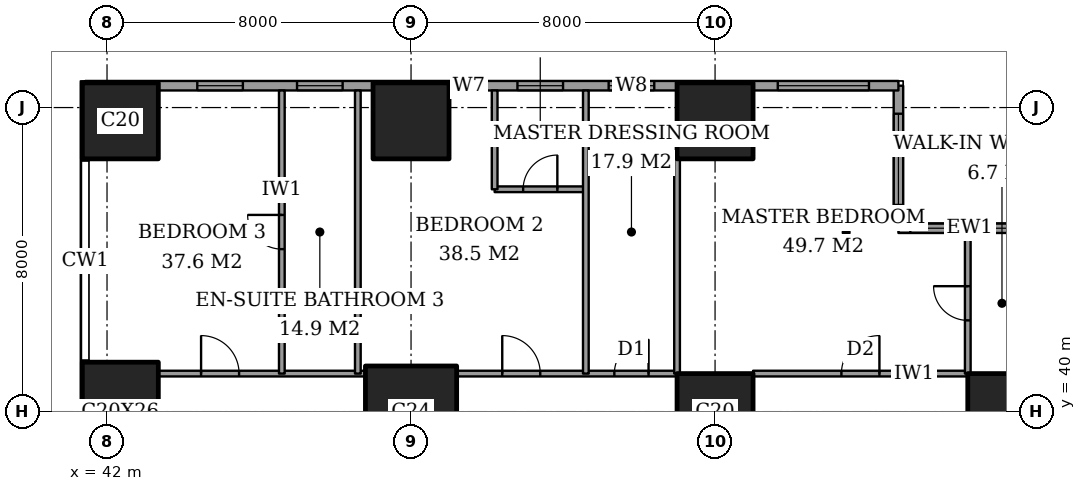
"""IFC4 building model, lengths in metres.
Left out: names, types, materials, properties, quantities, classifications, styles, units other than length and angle.
Written with IfcOpenShell. Run it as: python <this file> out.ifc"""

import sys

from ifc_helpers import new_model, si_unit, direction, frame, frame_2d, origin, origin_2d, place, context, subcontext, project, spatial, rectangle, extrude, element, fill, save


model = new_model("IFC4")
c1 = context("Model", 3, precision=1e-05, world=origin(), true_north=direction((0.0, 1.0)))
c2 = subcontext(c1, "Body", "Model", "MODEL_VIEW")
j1 = project(units=[si_unit("LENGTHUNIT", "METRE"), si_unit("PLANEANGLEUNIT", "RADIAN")], contexts=[c1])
p1 = place(None, origin())
s1 = spatial("IfcSite", under=j1, at=p1, CompositionType="ELEMENT")
p2 = place(p1, origin())
s2 = spatial("IfcBuilding", under=s1, at=p2, CompositionType="ELEMENT")
p3 = place(p2, frame((0.0, 0.0, 44.0)))
s3 = spatial("IfcBuildingStorey", under=s2, at=p3, CompositionType="ELEMENT", Elevation=44.0)
p4 = place(p3, frame((42.35, 40.0, 0.0), z_axis=(0.0, 0.0, 1.0), x_axis=(1.0, 0.0, 0.0)))
e1 = element("IfcColumn", 1, at=p4, inside=s3, PredefinedType="COLUMN", context=c2, shape_type="SweptSolid", body=[
    extrude(rectangle(XDim=2.0, YDim=2.6, at=origin_2d()), origin(), (0.0, 0.0, 1.0), 3.6),
])
p5 = place(p3, frame((42.35, 47.65, 0.0), z_axis=(0.0, 0.0, 1.0), x_axis=(1.0, 0.0, 0.0)))
e2 = element("IfcColumn", 2, at=p5, inside=s3, PredefinedType="COLUMN", context=c2, shape_type="SweptSolid", body=[
    extrude(rectangle(XDim=2.0, YDim=2.0, at=origin_2d()), origin(), (0.0, 0.0, 1.0), 3.6),
])
p6 = place(p3, frame((50.0, 40.0, 0.0), z_axis=(0.0, 0.0, 1.0), x_axis=(1.0, 0.0, 0.0)))
e3 = element("IfcColumn", 3, at=p6, inside=s3, PredefinedType="COLUMN", context=c2, shape_type="SweptSolid", body=[
    extrude(rectangle(XDim=2.4, YDim=2.4, at=origin_2d()), origin(), (0.0, 0.0, 1.0), 3.6),
])
for number, where, z_axis, x_axis in (
    (4, (50.0, 47.65, 0.0), (0.0, 0.0, 1.0), (1.0, 0.0, 0.0)),
    (5, (58.0, 40.0, 0.0), (0.0, 0.0, 1.0), (1.0, 0.0, 0.0)),
    (6, (58.0, 47.65, 0.0), (0.0, 0.0, 1.0), (1.0, 0.0, 0.0)),
    (7, (65.65, 40.0, 0.0), (0.0, 0.0, 1.0), (1.0, 0.0, 0.0)),
):
    element("IfcColumn", number, at=place(p3, frame(where, z_axis=z_axis, x_axis=x_axis)), inside=s3, PredefinedType="COLUMN", context=c2, shape_type="SweptSolid", body=[
        extrude(rectangle(XDim=2.0, YDim=2.0, at=origin_2d()), origin(), (0.0, 0.0, 1.0), 3.6),
    ])
p7 = place(p3, frame((66.575, 44.825, 0.0), z_axis=(0.0, 0.0, 1.0), x_axis=(-1.0, 0.0, 0.0)))
e8 = element("IfcWall", 8, at=p7, inside=s3, PredefinedType="SOLIDWALL", context=c2, shape_type="SweptSolid", body=[
    extrude(rectangle(XDim=3.75, YDim=0.25, at=frame_2d((1.875, 0.0))), origin(), (0.0, 0.0, 1.0), 3.6),
])
p8 = place(p7, frame((0.5, 0.0, 0.6)))
e9 = element("IfcOpeningElement", 9, at=p8, cuts=e8, PredefinedType="OPENING", context=c2, shape_type="SweptSolid", body=[
    extrude(rectangle(XDim=1.2, YDim=2.0, at=frame_2d((0.6, 1.0))), frame((0.0, 0.135, 0.0), z_axis=(0.0, -1.0, 0.0), x_axis=(1.0, 0.0, 0.0)), (0.0, 0.0, 1.0), 0.27),
])
p9 = place(p7, frame((2.238, 0.0, 0.6)))
e10 = element("IfcOpeningElement", 10, at=p9, cuts=e8, PredefinedType="OPENING", context=c2, shape_type="SweptSolid", body=[
    extrude(rectangle(XDim=1.2, YDim=2.0, at=frame_2d((0.6, 1.0))), frame((0.0, 0.135, 0.0), z_axis=(0.0, -1.0, 0.0), x_axis=(1.0, 0.0, 0.0)), (0.0, 0.0, 1.0), 0.27),
])
p10 = place(p3, frame((62.825, 44.825, 0.0), z_axis=(0.0, 0.0, 1.0), x_axis=(0.0, 1.0, 0.0)))
e11 = element("IfcWall", 11, at=p10, inside=s3, PredefinedType="SOLIDWALL", context=c2, shape_type="SweptSolid", body=[
    extrude(rectangle(XDim=3.75, YDim=0.25, at=frame_2d((1.875, 0.0))), origin(), (0.0, 0.0, 1.0), 3.6),
])
p11 = place(p10, frame((0.613, 0.0, 0.6)))
e12 = element("IfcOpeningElement", 12, at=p11, cuts=e11, PredefinedType="OPENING", context=c2, shape_type="SweptSolid", body=[
    extrude(rectangle(XDim=2.4, YDim=2.0, at=frame_2d((1.2, 1.0))), frame((0.0, 0.135, 0.0), z_axis=(0.0, -1.0, 0.0), x_axis=(1.0, 0.0, 0.0)), (0.0, 0.0, 1.0), 0.27),
])
p12 = place(p3, frame((62.825, 48.575, 0.0), z_axis=(0.0, 0.0, 1.0), x_axis=(-1.0, 0.0, 0.0)))
e13 = element("IfcWall", 13, at=p12, inside=s3, PredefinedType="SOLIDWALL", context=c2, shape_type="SweptSolid", body=[
    extrude(rectangle(XDim=21.4, YDim=0.25, at=frame_2d((10.7, 0.0))), origin(), (0.0, 0.0, 1.0), 3.6),
])
p13 = place(p12, frame((0.775, 0.0, 0.6)))
e14 = element("IfcOpeningElement", 14, at=p13, cuts=e13, PredefinedType="OPENING", context=c2, shape_type="SweptSolid", body=[
    extrude(rectangle(XDim=2.4, YDim=2.0, at=frame_2d((1.2, 1.0))), frame((0.0, 0.135, 0.0), z_axis=(0.0, -1.0, 0.0), x_axis=(1.0, 0.0, 0.0)), (0.0, 0.0, 1.0), 0.27),
])
p14 = place(p12, frame((6.425, 0.0, 0.6)))
e15 = element("IfcOpeningElement", 15, at=p14, cuts=e13, PredefinedType="OPENING", context=c2, shape_type="SweptSolid", body=[
    extrude(rectangle(XDim=1.2, YDim=2.0, at=frame_2d((0.6, 1.0))), frame((0.0, 0.135, 0.0), z_axis=(0.0, -1.0, 0.0), x_axis=(1.0, 0.0, 0.0)), (0.0, 0.0, 1.0), 0.27),
])
p15 = place(p12, frame((8.825, 0.0, 0.6)))
e16 = element("IfcOpeningElement", 16, at=p15, cuts=e13, PredefinedType="OPENING", context=c2, shape_type="SweptSolid", body=[
    extrude(rectangle(XDim=1.2, YDim=2.0, at=frame_2d((0.6, 1.0))), frame((0.0, 0.135, 0.0), z_axis=(0.0, -1.0, 0.0), x_axis=(1.0, 0.0, 0.0)), (0.0, 0.0, 1.0), 0.27),
])
p16 = place(p12, frame((11.0, 0.0, 0.6)))
e17 = element("IfcOpeningElement", 17, at=p16, cuts=e13, PredefinedType="OPENING", context=c2, shape_type="SweptSolid", body=[
    extrude(rectangle(XDim=0.6, YDim=2.0, at=frame_2d((0.3, 1.0))), frame((0.0, 0.135, 0.0), z_axis=(0.0, -1.0, 0.0), x_axis=(1.0, 0.0, 0.0)), (0.0, 0.0, 1.0), 0.27),
])
p17 = place(p12, frame((14.625, 0.0, 0.6)))
e18 = element("IfcOpeningElement", 18, at=p17, cuts=e13, PredefinedType="OPENING", context=c2, shape_type="SweptSolid", body=[
    extrude(rectangle(XDim=1.2, YDim=2.0, at=frame_2d((0.6, 1.0))), frame((0.0, 0.135, 0.0), z_axis=(0.0, -1.0, 0.0), x_axis=(1.0, 0.0, 0.0)), (0.0, 0.0, 1.0), 0.27),
])
p18 = place(p12, frame((17.25, 0.0, 0.6)))
e19 = element("IfcOpeningElement", 19, at=p18, cuts=e13, PredefinedType="OPENING", context=c2, shape_type="SweptSolid", body=[
    extrude(rectangle(XDim=1.2, YDim=2.0, at=frame_2d((0.6, 1.0))), frame((0.0, 0.135, 0.0), z_axis=(0.0, -1.0, 0.0), x_axis=(1.0, 0.0, 0.0)), (0.0, 0.0, 1.0), 0.27),
])
p19 = place(p3, frame((43.35, 41.0, 0.0), z_axis=(0.0, 0.0, 1.0), x_axis=(1.0, 0.0, 0.0)))
e20 = element("IfcWall", 20, at=p19, inside=s3, PredefinedType="PARTITIONING", context=c2, shape_type="SweptSolid", body=[
    extrude(rectangle(XDim=5.45, YDim=0.15, at=frame_2d((2.725, 0.0))), origin(), (0.0, 0.0, 1.0), 3.35),
])
p20 = place(p19, frame((1.125, 0.0, 0.0)))
e21 = element("IfcOpeningElement", 21, at=p20, cuts=e20, PredefinedType="OPENING", context=c2, shape_type="SweptSolid", body=[
    extrude(rectangle(XDim=1.0, YDim=2.1, at=frame_2d((0.5, 1.05))), frame((0.0, 0.085, 0.0), z_axis=(0.0, -1.0, 0.0), x_axis=(1.0, 0.0, 0.0)), (0.0, 0.0, 1.0), 0.17),
])
p21 = place(p3, frame((51.2, 41.0, 0.0), z_axis=(0.0, 0.0, 1.0), x_axis=(1.0, 0.0, 0.0)))
e22 = element("IfcWall", 22, at=p21, inside=s3, PredefinedType="PARTITIONING", context=c2, shape_type="SweptSolid", body=[
    extrude(rectangle(XDim=5.8, YDim=0.15, at=frame_2d((2.9, 0.0))), origin(), (0.0, 0.0, 1.0), 3.35),
])
p22 = place(p21, frame((4.15, 0.0, 0.0)))
e23 = element("IfcOpeningElement", 23, at=p22, cuts=e22, PredefinedType="OPENING", context=c2, shape_type="SweptSolid", body=[
    extrude(rectangle(XDim=0.9, YDim=2.1, at=frame_2d((0.45, 1.05))), frame((0.0, 0.085, 0.0), z_axis=(0.0, -1.0, 0.0), x_axis=(1.0, 0.0, 0.0)), (0.0, 0.0, 1.0), 0.17),
])
p23 = place(p21, frame((1.2, 0.0, 0.0)))
e24 = element("IfcOpeningElement", 24, at=p23, cuts=e22, PredefinedType="OPENING", context=c2, shape_type="SweptSolid", body=[
    extrude(rectangle(XDim=1.0, YDim=2.1, at=frame_2d((0.5, 1.05))), frame((0.0, 0.085, 0.0), z_axis=(0.0, -1.0, 0.0), x_axis=(1.0, 0.0, 0.0)), (0.0, 0.0, 1.0), 0.17),
])
p24 = place(p3, frame((59.0, 41.0, 0.0), z_axis=(0.0, 0.0, 1.0), x_axis=(1.0, 0.0, 0.0)))
e25 = element("IfcWall", 25, at=p24, inside=s3, PredefinedType="PARTITIONING", context=c2, shape_type="SweptSolid", body=[
    extrude(rectangle(XDim=5.65, YDim=0.15, at=frame_2d((2.825, 0.0))), origin(), (0.0, 0.0, 1.0), 3.35),
])
p25 = place(p24, frame((2.325, 0.0, 0.0)))
e26 = element("IfcOpeningElement", 26, at=p25, cuts=e25, PredefinedType="OPENING", context=c2, shape_type="SweptSolid", body=[
    extrude(rectangle(XDim=1.0, YDim=2.1, at=frame_2d((0.5, 1.05))), frame((0.0, 0.085, 0.0), z_axis=(0.0, -1.0, 0.0), x_axis=(1.0, 0.0, 0.0)), (0.0, 0.0, 1.0), 0.17),
])
p26 = place(p3, frame((52.2, 45.85, 0.0), z_axis=(0.0, 0.0, 1.0), x_axis=(1.0, 0.0, 0.0)))
e27 = element("IfcWall", 27, at=p26, inside=s3, PredefinedType="PARTITIONING", context=c2, shape_type="SweptSolid", body=[
    extrude(rectangle(XDim=2.4, YDim=0.15, at=frame_2d((1.2, 0.0))), origin(), (0.0, 0.0, 1.0), 3.35),
])
p27 = place(p26, frame((0.75, 0.0, 0.0)))
e28 = element("IfcOpeningElement", 28, at=p27, cuts=e27, PredefinedType="OPENING", context=c2, shape_type="SweptSolid", body=[
    extrude(rectangle(XDim=0.9, YDim=2.1, at=frame_2d((0.45, 1.05))), frame((0.0, 0.085, 0.0), z_axis=(0.0, -1.0, 0.0), x_axis=(1.0, 0.0, 0.0)), (0.0, 0.0, 1.0), 0.17),
])
p28 = place(p3, frame((46.6, 41.0, 0.0), z_axis=(0.0, 0.0, 1.0), x_axis=(0.0, 1.0, 0.0)))
e29 = element("IfcWall", 29, at=p28, inside=s3, PredefinedType="PARTITIONING", context=c2, shape_type="SweptSolid", body=[
    extrude(rectangle(XDim=7.45, YDim=0.15, at=frame_2d((3.725, 0.0))), origin(), (0.0, 0.0, 1.0), 3.35),
])
p29 = place(p28, frame((3.275, 0.0, 0.0)))
e30 = element("IfcOpeningElement", 30, at=p29, cuts=e29, PredefinedType="OPENING", context=c2, shape_type="SweptSolid", body=[
    extrude(rectangle(XDim=0.9, YDim=2.1, at=frame_2d((0.45, 1.05))), frame((0.0, 0.085, 0.0), z_axis=(0.0, -1.0, 0.0), x_axis=(1.0, 0.0, 0.0)), (0.0, 0.0, 1.0), 0.17),
])
p30 = place(p3, frame((48.6, 41.0, 0.0), z_axis=(0.0, 0.0, 1.0), x_axis=(0.0, 1.0, 0.0)))
e31 = element("IfcWall", 31, at=p30, inside=s3, PredefinedType="PARTITIONING", context=c2, shape_type="SweptSolid", body=[
    extrude(rectangle(XDim=7.45, YDim=0.15, at=frame_2d((3.725, 0.0))), origin(), (0.0, 0.0, 1.0), 3.35),
])
p31 = place(p3, frame((52.2, 45.85, 0.0), z_axis=(0.0, 0.0, 1.0), x_axis=(0.0, 1.0, 0.0)))
e32 = element("IfcWall", 32, at=p31, inside=s3, PredefinedType="PARTITIONING", context=c2, shape_type="SweptSolid", body=[
    extrude(rectangle(XDim=2.6, YDim=0.15, at=frame_2d((1.3, 0.0))), origin(), (0.0, 0.0, 1.0), 3.35),
])
p32 = place(p3, frame((54.6, 41.0, 0.0), z_axis=(0.0, 0.0, 1.0), x_axis=(0.0, 1.0, 0.0)))
e33 = element("IfcWall", 33, at=p32, inside=s3, PredefinedType="PARTITIONING", context=c2, shape_type="SweptSolid", body=[
    extrude(rectangle(XDim=7.45, YDim=0.15, at=frame_2d((3.725, 0.0))), origin(), (0.0, 0.0, 1.0), 3.35),
])
p33 = place(p3, frame((57.0, 41.0, 0.0), z_axis=(0.0, 0.0, 1.0), x_axis=(0.0, 1.0, 0.0)))
e34 = element("IfcWall", 34, at=p33, inside=s3, PredefinedType="PARTITIONING", context=c2, shape_type="SweptSolid", body=[
    extrude(rectangle(XDim=5.65, YDim=0.15, at=frame_2d((2.825, 0.0))), origin(), (0.0, 0.0, 1.0), 3.35),
])
p34 = place(p3, frame((64.65, 41.0, 0.0), z_axis=(0.0, 0.0, 1.0), x_axis=(0.0, 1.0, 0.0)))
e35 = element("IfcWall", 35, at=p34, inside=s3, PredefinedType="PARTITIONING", context=c2, shape_type="SweptSolid", body=[
    extrude(rectangle(XDim=3.7, YDim=0.15, at=frame_2d((1.85, 0.0))), origin(), (0.0, 0.0, 1.0), 3.35),
])
p35 = place(p34, frame((1.4, 0.0, 0.0)))
e36 = element("IfcOpeningElement", 36, at=p35, cuts=e35, PredefinedType="OPENING", context=c2, shape_type="SweptSolid", body=[
    extrude(rectangle(XDim=0.9, YDim=2.1, at=frame_2d((0.45, 1.05))), frame((0.0, 0.085, 0.0), z_axis=(0.0, -1.0, 0.0), x_axis=(1.0, 0.0, 0.0)), (0.0, 0.0, 1.0), 0.17),
])
p36 = place(p8, origin())
e37 = element("IfcWindow", 37, at=p36, inside=s3, PartitioningType="SINGLE_PANEL", PredefinedType="WINDOW", context=c2, shape_type="SweptSolid", body=[
    extrude(rectangle(XDim=1.2, YDim=2.0, at=frame_2d((0.6, 1.0))), frame((0.0, 0.03, 0.0), z_axis=(0.0, -1.0, 0.0), x_axis=(1.0, 0.0, 0.0)), (0.0, 0.0, 1.0), 0.06),
])
fill(e9, e37)
p37 = place(p9, origin())
e38 = element("IfcWindow", 38, at=p37, inside=s3, PartitioningType="SINGLE_PANEL", PredefinedType="WINDOW", context=c2, shape_type="SweptSolid", body=[
    extrude(rectangle(XDim=1.2, YDim=2.0, at=frame_2d((0.6, 1.0))), frame((0.0, 0.03, 0.0), z_axis=(0.0, -1.0, 0.0), x_axis=(1.0, 0.0, 0.0)), (0.0, 0.0, 1.0), 0.06),
])
fill(e10, e38)
p38 = place(p11, origin())
e39 = element("IfcWindow", 39, at=p38, inside=s3, PartitioningType="SINGLE_PANEL", PredefinedType="WINDOW", context=c2, shape_type="SweptSolid", body=[
    extrude(rectangle(XDim=2.4, YDim=2.0, at=frame_2d((1.2, 1.0))), frame((0.0, 0.03, 0.0), z_axis=(0.0, -1.0, 0.0), x_axis=(1.0, 0.0, 0.0)), (0.0, 0.0, 1.0), 0.06),
])
fill(e12, e39)
p39 = place(p13, origin())
e40 = element("IfcWindow", 40, at=p39, inside=s3, PartitioningType="SINGLE_PANEL", PredefinedType="WINDOW", context=c2, shape_type="SweptSolid", body=[
    extrude(rectangle(XDim=2.4, YDim=2.0, at=frame_2d((1.2, 1.0))), frame((0.0, 0.03, 0.0), z_axis=(0.0, -1.0, 0.0), x_axis=(1.0, 0.0, 0.0)), (0.0, 0.0, 1.0), 0.06),
])
fill(e14, e40)
p40 = place(p14, origin())
e41 = element("IfcWindow", 41, at=p40, inside=s3, PartitioningType="SINGLE_PANEL", PredefinedType="WINDOW", context=c2, shape_type="SweptSolid", body=[
    extrude(rectangle(XDim=1.2, YDim=2.0, at=frame_2d((0.6, 1.0))), frame((0.0, 0.03, 0.0), z_axis=(0.0, -1.0, 0.0), x_axis=(1.0, 0.0, 0.0)), (0.0, 0.0, 1.0), 0.06),
])
fill(e15, e41)
p41 = place(p15, origin())
e42 = element("IfcWindow", 42, at=p41, inside=s3, PartitioningType="SINGLE_PANEL", PredefinedType="WINDOW", context=c2, shape_type="SweptSolid", body=[
    extrude(rectangle(XDim=1.2, YDim=2.0, at=frame_2d((0.6, 1.0))), frame((0.0, 0.03, 0.0), z_axis=(0.0, -1.0, 0.0), x_axis=(1.0, 0.0, 0.0)), (0.0, 0.0, 1.0), 0.06),
])
fill(e16, e42)
p42 = place(p16, origin())
e43 = element("IfcWindow", 43, at=p42, inside=s3, PartitioningType="SINGLE_PANEL", PredefinedType="WINDOW", context=c2, shape_type="SweptSolid", body=[
    extrude(rectangle(XDim=0.6, YDim=2.0, at=frame_2d((0.3, 1.0))), frame((0.0, 0.03, 0.0), z_axis=(0.0, -1.0, 0.0), x_axis=(1.0, 0.0, 0.0)), (0.0, 0.0, 1.0), 0.06),
])
fill(e17, e43)
p43 = place(p17, origin())
e44 = element("IfcWindow", 44, at=p43, inside=s3, PartitioningType="SINGLE_PANEL", PredefinedType="WINDOW", context=c2, shape_type="SweptSolid", body=[
    extrude(rectangle(XDim=1.2, YDim=2.0, at=frame_2d((0.6, 1.0))), frame((0.0, 0.03, 0.0), z_axis=(0.0, -1.0, 0.0), x_axis=(1.0, 0.0, 0.0)), (0.0, 0.0, 1.0), 0.06),
])
fill(e18, e44)
p44 = place(p18, origin())
e45 = element("IfcWindow", 45, at=p44, inside=s3, PartitioningType="SINGLE_PANEL", PredefinedType="WINDOW", context=c2, shape_type="SweptSolid", body=[
    extrude(rectangle(XDim=1.2, YDim=2.0, at=frame_2d((0.6, 1.0))), frame((0.0, 0.03, 0.0), z_axis=(0.0, -1.0, 0.0), x_axis=(1.0, 0.0, 0.0)), (0.0, 0.0, 1.0), 0.06),
])
fill(e19, e45)
p45 = place(p35, origin())
e46 = element("IfcDoor", 46, at=p45, inside=s3, OperationType="SINGLE_SWING_LEFT", PredefinedType="DOOR", context=c2, shape_type="SweptSolid", body=[
    extrude(rectangle(XDim=0.9, YDim=2.1, at=frame_2d((0.45, 1.05))), frame((0.0, 0.025, 0.0), z_axis=(0.0, -1.0, 0.0), x_axis=(1.0, 0.0, 0.0)), (0.0, 0.0, 1.0), 0.05),
])
fill(e36, e46)
p46 = place(p25, origin())
e47 = element("IfcDoor", 47, at=p46, inside=s3, OperationType="SINGLE_SWING_LEFT", PredefinedType="DOOR", context=c2, shape_type="SweptSolid", body=[
    extrude(rectangle(XDim=1.0, YDim=2.1, at=frame_2d((0.5, 1.05))), frame((0.0, 0.025, 0.0), z_axis=(0.0, -1.0, 0.0), x_axis=(1.0, 0.0, 0.0)), (0.0, 0.0, 1.0), 0.05),
])
fill(e26, e47)
p47 = place(p22, origin())
e48 = element("IfcDoor", 48, at=p47, inside=s3, OperationType="SINGLE_SWING_LEFT", PredefinedType="DOOR", context=c2, shape_type="SweptSolid", body=[
    extrude(rectangle(XDim=0.9, YDim=2.1, at=frame_2d((0.45, 1.05))), frame((0.0, 0.025, 0.0), z_axis=(0.0, -1.0, 0.0), x_axis=(1.0, 0.0, 0.0)), (0.0, 0.0, 1.0), 0.05),
])
fill(e23, e48)
p48 = place(p27, origin())
e49 = element("IfcDoor", 49, at=p48, inside=s3, OperationType="SINGLE_SWING_LEFT", PredefinedType="DOOR", context=c2, shape_type="SweptSolid", body=[
    extrude(rectangle(XDim=0.9, YDim=2.1, at=frame_2d((0.45, 1.05))), frame((0.0, 0.025, 0.0), z_axis=(0.0, -1.0, 0.0), x_axis=(1.0, 0.0, 0.0)), (0.0, 0.0, 1.0), 0.05),
])
fill(e28, e49)
p49 = place(p23, origin())
e50 = element("IfcDoor", 50, at=p49, inside=s3, OperationType="SINGLE_SWING_RIGHT", PredefinedType="DOOR", context=c2, shape_type="SweptSolid", body=[
    extrude(rectangle(XDim=1.0, YDim=2.1, at=frame_2d((0.5, 1.05))), frame((0.0, 0.025, 0.0), z_axis=(0.0, -1.0, 0.0), x_axis=(1.0, 0.0, 0.0)), (0.0, 0.0, 1.0), 0.05),
])
fill(e24, e50)
p50 = place(p29, origin())
e51 = element("IfcDoor", 51, at=p50, inside=s3, OperationType="SINGLE_SWING_LEFT", PredefinedType="DOOR", context=c2, shape_type="SweptSolid", body=[
    extrude(rectangle(XDim=0.9, YDim=2.1, at=frame_2d((0.45, 1.05))), frame((0.0, 0.025, 0.0), z_axis=(0.0, -1.0, 0.0), x_axis=(1.0, 0.0, 0.0)), (0.0, 0.0, 1.0), 0.05),
])
fill(e30, e51)
p51 = place(p20, origin())
e52 = element("IfcDoor", 52, at=p51, inside=s3, OperationType="SINGLE_SWING_RIGHT", PredefinedType="DOOR", context=c2, shape_type="SweptSolid", body=[
    extrude(rectangle(XDim=1.0, YDim=2.1, at=frame_2d((0.5, 1.05))), frame((0.0, 0.025, 0.0), z_axis=(0.0, -1.0, 0.0), x_axis=(1.0, 0.0, 0.0)), (0.0, 0.0, 1.0), 0.05),
])
fill(e21, e52)
save(model, sys.argv[1])
